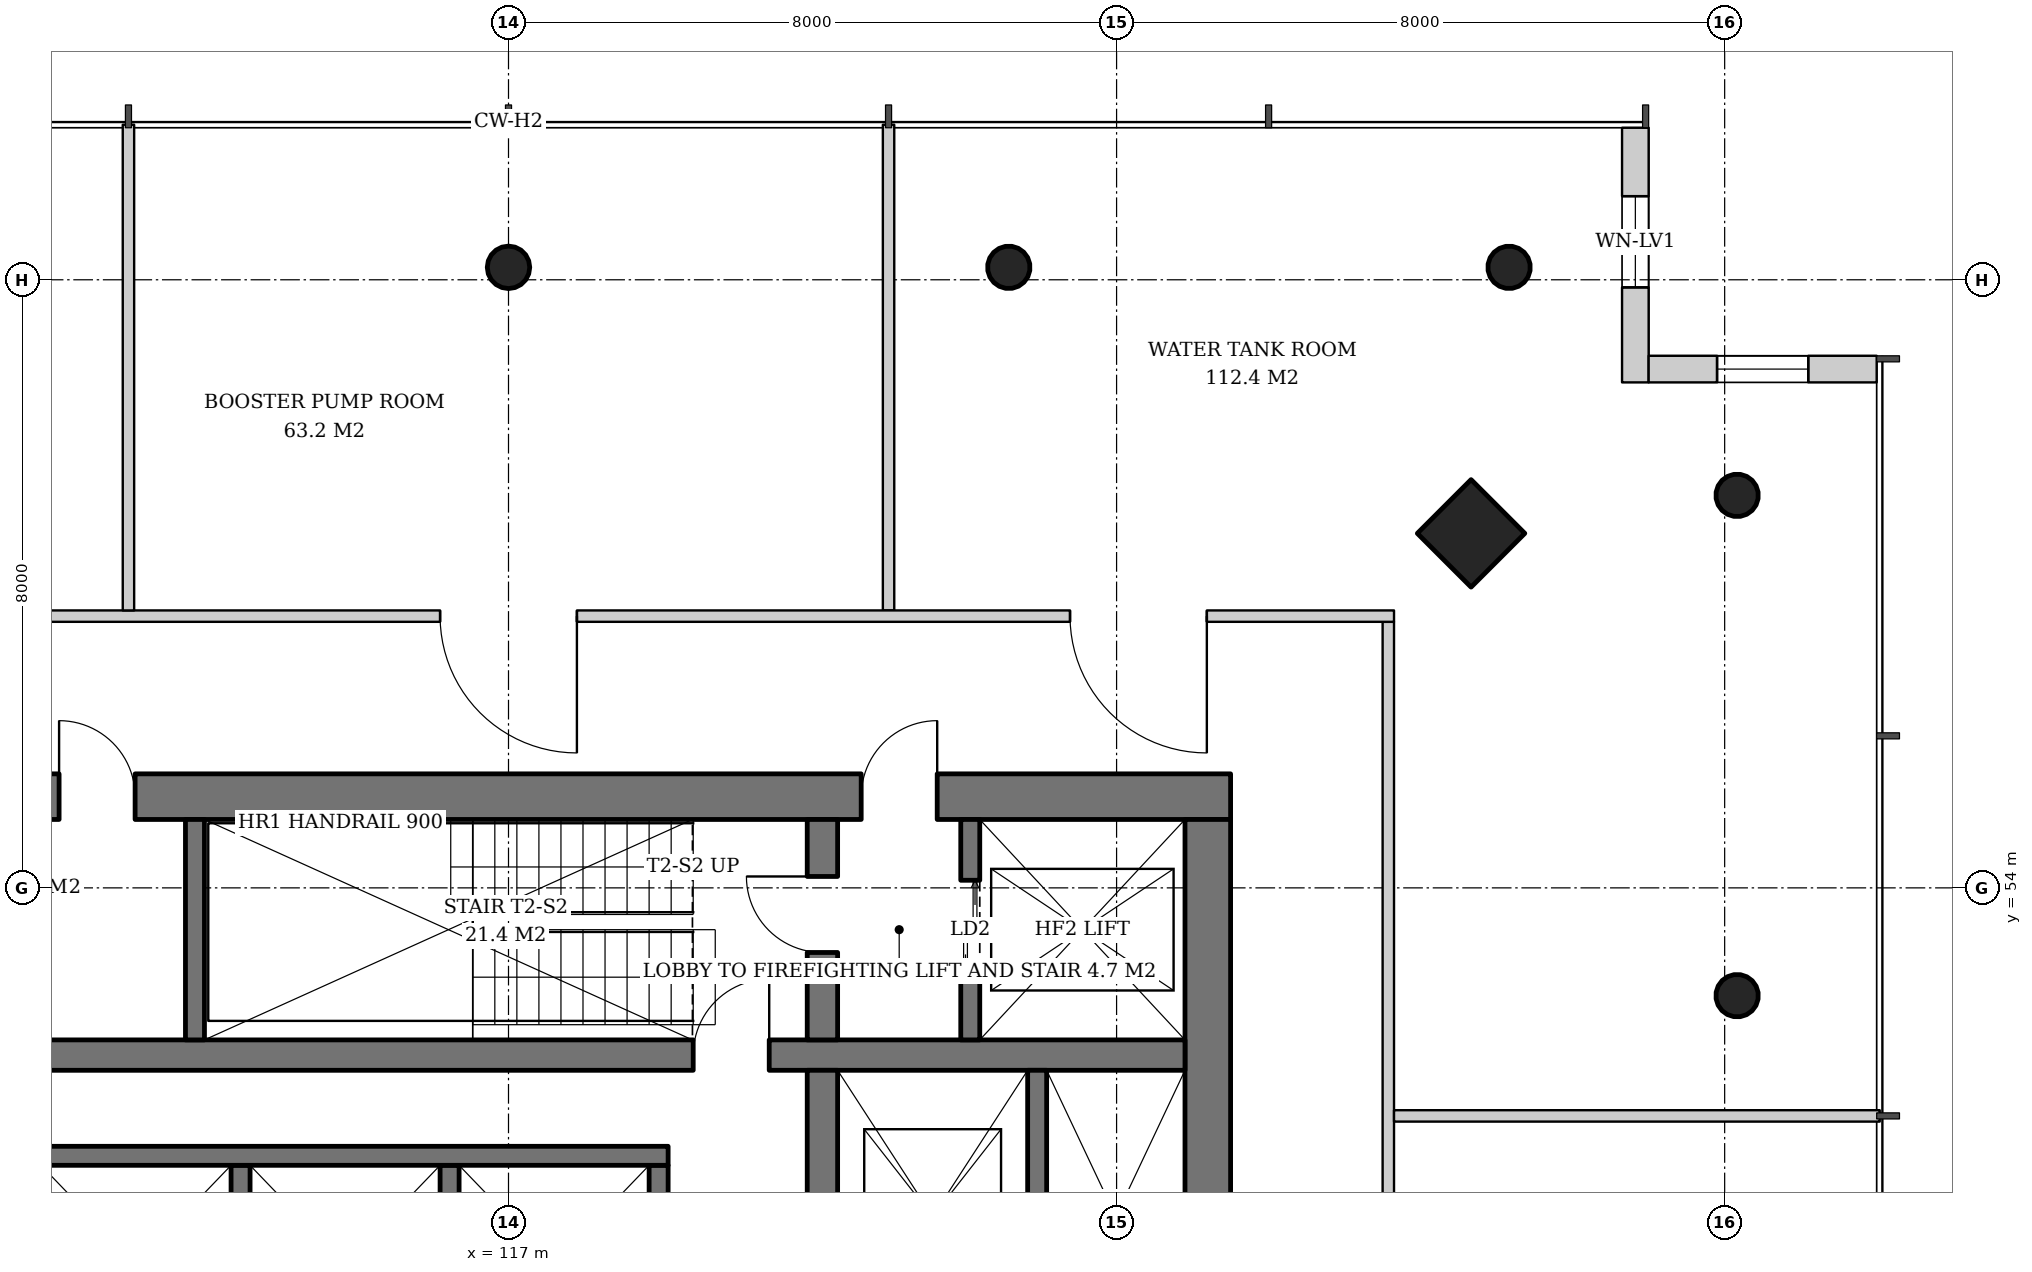
"""IFC4 building model, lengths in metres.
Left out: names, types, materials, properties, quantities, classifications, styles, units other than length and angle.
Written with IfcOpenShell. Run it as: python <this file> out.ifc"""

import sys

from ifc_helpers import new_model, si_unit, direction, frame, frame_2d, origin, origin_2d, place, context, subcontext, project, spatial, rectangle, hollow_circle, extrude, element, fill, save


model = new_model("IFC4")
c1 = context("Model", 3, precision=1e-05, world=origin(), true_north=direction((0.0, 1.0)))
c2 = subcontext(c1, "Body", "Model", "MODEL_VIEW")
j1 = project(units=[si_unit("LENGTHUNIT", "METRE"), si_unit("PLANEANGLEUNIT", "RADIAN")], contexts=[c1])
p1 = place(None, origin())
s1 = spatial("IfcSite", under=j1, at=p1, CompositionType="ELEMENT")
p2 = place(p1, origin())
s2 = spatial("IfcBuilding", under=s1, at=p2, CompositionType="ELEMENT")
p3 = place(p2, frame((0.0, 0.0, 85.6)))
s3 = spatial("IfcBuildingStorey", under=s2, at=p3, CompositionType="ELEMENT", Elevation=85.6)
p4 = place(p3, frame((129.716, 58.716, 0.0), z_axis=(-0.043032401563, -0.043032401563, 0.998146494675), x_axis=(0.707106781187, -0.707106781187, 0.0)))
e1 = element("IfcColumn", 1, at=p4, inside=s3, PredefinedType="COLUMN", context=c2, shape_type="SweptSolid", body=[
    extrude(rectangle(XDim=1.0, YDim=1.0, at=origin_2d()), origin(), (0.0, 0.0, 1.0), 3.807),
])
p5 = place(p3, frame((133.216, 59.216, 0.0), z_axis=(-0.043032401563, -0.043032401563, 0.998146494675), x_axis=(0.707106781187, -0.707106781187, 0.0)))
e2 = element("IfcColumn", 2, at=p5, inside=s3, PredefinedType="COLUMN", context=c2, shape_type="SweptSolid", body=[
    extrude(hollow_circle(Radius=0.28, WallThickness=0.02, at=origin_2d()), origin(), (0.0, 0.0, 1.0), 3.807),
])
p6 = place(p3, frame((133.216, 52.608, 0.0), z_axis=(-0.04306234503, -0.02149908433, 0.998841040313), x_axis=(0.446680166538, -0.894693706707, 0.0)))
e3 = element("IfcColumn", 3, at=p6, inside=s3, PredefinedType="COLUMN", context=c2, shape_type="SweptSolid", body=[
    extrude(hollow_circle(Radius=0.28, WallThickness=0.02, at=origin_2d()), origin(), (0.0, 0.0, 1.0), 3.804),
])
p7 = place(p3, frame((130.216, 62.216, 0.0), z_axis=(-0.043032401563, -0.043032401563, 0.998146494675), x_axis=(0.707106781187, -0.707106781187, 0.0)))
e4 = element("IfcColumn", 4, at=p7, inside=s3, PredefinedType="COLUMN", context=c2, shape_type="SweptSolid", body=[
    extrude(hollow_circle(Radius=0.28, WallThickness=0.02, at=origin_2d()), origin(), (0.0, 0.0, 1.0), 3.807),
])
p8 = place(p3, frame((123.608, 62.216, 0.0), z_axis=(-0.02149908433, -0.04306234503, 0.998841040313), x_axis=(0.894693706707, -0.446680166538, 0.0)))
e5 = element("IfcColumn", 5, at=p8, inside=s3, PredefinedType="COLUMN", context=c2, shape_type="SweptSolid", body=[
    extrude(hollow_circle(Radius=0.28, WallThickness=0.02, at=origin_2d()), origin(), (0.0, 0.0, 1.0), 3.804),
])
p9 = place(p3, frame((117.0, 62.216, 0.0), z_axis=(0.0, -0.043072300418, 0.999071957837), x_axis=(1.0, 0.0, 0.0)))
e6 = element("IfcColumn", 6, at=p9, inside=s3, PredefinedType="COLUMN", context=c2, shape_type="SweptSolid", body=[
    extrude(hollow_circle(Radius=0.28, WallThickness=0.02, at=origin_2d()), origin(), (0.0, 0.0, 1.0), 3.803),
])
p10 = place(p3, frame((107.5, 55.2, 0.0), z_axis=(0.0, 0.0, 1.0), x_axis=(1.0, 0.0, 0.0)))
e7 = element("IfcWall", 7, at=p10, inside=s3, PredefinedType="SHEAR", context=c2, shape_type="SweptSolid", body=[
    extrude(rectangle(XDim=19.0, YDim=0.6, at=frame_2d((9.5, 0.0))), origin(), (0.0, 0.0, 1.0), 3.8),
])
p11 = place(p10, frame((14.14, 0.0, 0.0)))
e8 = element("IfcOpeningElement", 8, at=p11, cuts=e7, PredefinedType="OPENING", context=c2, shape_type="SweptSolid", body=[
    extrude(rectangle(XDim=1.0, YDim=2.1, at=frame_2d((0.5, 1.05))), frame((0.0, 0.31, 0.0), z_axis=(0.0, -1.0, 0.0), x_axis=(1.0, 0.0, 0.0)), (0.0, 0.0, 1.0), 0.62),
])
p12 = place(p10, frame((1.675, 0.0, 0.0)))
e9 = element("IfcOpeningElement", 9, at=p12, cuts=e7, PredefinedType="OPENING", context=c2, shape_type="SweptSolid", body=[
    extrude(rectangle(XDim=1.0, YDim=2.1, at=frame_2d((0.5, 1.05))), frame((0.0, 0.31, 0.0), z_axis=(0.0, -1.0, 0.0), x_axis=(1.0, 0.0, 0.0)), (0.0, 0.0, 1.0), 0.62),
])
p13 = place(p10, frame((3.587, 0.0, 0.0)))
e10 = element("IfcOpeningElement", 10, at=p13, cuts=e7, PredefinedType="OPENING", context=c2, shape_type="SweptSolid", body=[
    extrude(rectangle(XDim=1.0, YDim=2.1, at=frame_2d((0.5, 1.05))), frame((0.0, 0.31, 0.0), z_axis=(0.0, -1.0, 0.0), x_axis=(1.0, 0.0, 0.0)), (0.0, 0.0, 1.0), 0.62),
])
p14 = place(p3, frame((126.2, 37.1, 0.0), z_axis=(0.0, 0.0, 1.0), x_axis=(0.0, 1.0, 0.0)))
e11 = element("IfcWall", 11, at=p14, inside=s3, PredefinedType="SHEAR", context=c2, shape_type="SweptSolid", body=[
    extrude(rectangle(XDim=17.8, YDim=0.6, at=frame_2d((8.9, 0.0))), origin(), (0.0, 0.0, 1.0), 3.8),
])
p15 = place(p14, frame((8.0, 0.0, 0.0)))
e12 = element("IfcOpeningElement", 12, at=p15, cuts=e11, PredefinedType="OPENING", context=c2, shape_type="SweptSolid", body=[
    extrude(rectangle(XDim=1.8, YDim=2.4, at=frame_2d((0.9, 1.2))), frame((0.0, 0.31, 0.0), z_axis=(0.0, -1.0, 0.0), x_axis=(1.0, 0.0, 0.0)), (0.0, 0.0, 1.0), 0.62),
])
p16 = place(p3, frame((108.1, 51.8, 0.0), z_axis=(0.0, 0.0, 1.0), x_axis=(1.0, 0.0, 0.0)))
e13 = element("IfcWall", 13, at=p16, inside=s3, PredefinedType="SHEAR", context=c2, shape_type="SweptSolid", body=[
    extrude(rectangle(XDim=17.8, YDim=0.4, at=frame_2d((8.9, 0.0))), origin(), (0.0, 0.0, 1.0), 3.8),
])
p17 = place(p16, frame((11.33, 0.0, 0.0)))
e14 = element("IfcOpeningElement", 14, at=p17, cuts=e13, PredefinedType="OPENING", context=c2, shape_type="SweptSolid", body=[
    extrude(rectangle(XDim=1.0, YDim=2.1, at=frame_2d((0.5, 1.05))), frame((0.0, 0.21, 0.0), z_axis=(0.0, -1.0, 0.0), x_axis=(1.0, 0.0, 0.0)), (0.0, 0.0, 1.0), 0.42),
])
p18 = place(p3, frame((121.13, 40.4, 0.0), z_axis=(0.0, 0.0, 1.0), x_axis=(0.0, 1.0, 0.0)))
e15 = element("IfcWall", 15, at=p18, inside=s3, PredefinedType="SHEAR", context=c2, shape_type="SweptSolid", body=[
    extrude(rectangle(XDim=11.2, YDim=0.4, at=frame_2d((5.6, 0.0))), origin(), (0.0, 0.0, 1.0), 3.8),
])
p19 = place(p18, frame((5.1, 0.0, 0.0)))
e16 = element("IfcOpeningElement", 16, at=p19, cuts=e15, PredefinedType="OPENING", context=c2, shape_type="SweptSolid", body=[
    extrude(rectangle(XDim=1.0, YDim=2.1, at=frame_2d((0.5, 1.05))), frame((0.0, 0.21, 0.0), z_axis=(0.0, -1.0, 0.0), x_axis=(1.0, 0.0, 0.0)), (0.0, 0.0, 1.0), 0.42),
])
p20 = place(p3, frame((121.13, 52.0, 0.0), z_axis=(0.0, 0.0, 1.0), x_axis=(0.0, 1.0, 0.0)))
e17 = element("IfcWall", 17, at=p20, inside=s3, PredefinedType="SHEAR", context=c2, shape_type="SweptSolid", body=[
    extrude(rectangle(XDim=2.9, YDim=0.4, at=frame_2d((1.45, 0.0))), origin(), (0.0, 0.0, 1.0), 3.8),
])
p21 = place(p20, frame((1.15, 0.0, 0.0)))
e18 = element("IfcOpeningElement", 18, at=p21, cuts=e17, PredefinedType="OPENING", context=c2, shape_type="SweptSolid", body=[
    extrude(rectangle(XDim=1.0, YDim=2.1, at=frame_2d((0.5, 1.05))), frame((0.0, 0.21, 0.0), z_axis=(0.0, -1.0, 0.0), x_axis=(1.0, 0.0, 0.0)), (0.0, 0.0, 1.0), 0.42),
])
p22 = place(p3, frame((131.825, 64.0, 0.0), z_axis=(0.0, 0.0, 1.0), x_axis=(0.0, -1.0, 0.0)))
e19 = element("IfcWall", 19, at=p22, inside=s3, PredefinedType="SOLIDWALL", context=c2, shape_type="SweptSolid", body=[
    extrude(rectangle(XDim=3.35, YDim=0.35, at=frame_2d((1.675, 0.0))), origin(), (0.0, 0.0, 1.0), 3.6),
])
p23 = place(p22, frame((0.9, 0.0, 0.6)))
e20 = element("IfcOpeningElement", 20, at=p23, cuts=e19, PredefinedType="OPENING", context=c2, shape_type="SweptSolid", body=[
    extrude(rectangle(XDim=1.2, YDim=2.55, at=frame_2d((0.6, 1.275))), frame((0.0, 0.185, 0.0), z_axis=(0.0, -1.0, 0.0), x_axis=(1.0, 0.0, 0.0)), (0.0, 0.0, 1.0), 0.37),
])
p24 = place(p3, frame((132.0, 60.825, 0.0), z_axis=(0.0, 0.0, 1.0), x_axis=(1.0, 0.0, 0.0)))
e21 = element("IfcWall", 21, at=p24, inside=s3, PredefinedType="SOLIDWALL", context=c2, shape_type="SweptSolid", body=[
    extrude(rectangle(XDim=3.0, YDim=0.35, at=frame_2d((1.5, 0.0))), origin(), (0.0, 0.0, 1.0), 3.6),
])
p25 = place(p24, frame((0.9, 0.0, 0.6)))
e22 = element("IfcOpeningElement", 22, at=p25, cuts=e21, PredefinedType="OPENING", context=c2, shape_type="SweptSolid", body=[
    extrude(rectangle(XDim=1.2, YDim=2.55, at=frame_2d((0.6, 1.275))), frame((0.0, 0.185, 0.0), z_axis=(0.0, -1.0, 0.0), x_axis=(1.0, 0.0, 0.0)), (0.0, 0.0, 1.0), 0.37),
])
p26 = place(p3, frame((112.875, 52.0, 0.0), z_axis=(0.0, 0.0, 1.0), x_axis=(0.0, 1.0, 0.0)))
e23 = element("IfcWall", 23, at=p26, inside=s3, PredefinedType="SHEAR", context=c2, shape_type="SweptSolid", body=[
    extrude(rectangle(XDim=2.9, YDim=0.25, at=frame_2d((1.45, 0.0))), origin(), (0.0, 0.0, 1.0), 3.8),
])
p27 = place(p3, frame((123.075, 52.0, 0.0), z_axis=(0.0, 0.0, 1.0), x_axis=(0.0, 1.0, 0.0)))
e24 = element("IfcWall", 24, at=p27, inside=s3, PredefinedType="SHEAR", context=c2, shape_type="SweptSolid", body=[
    extrude(rectangle(XDim=2.9, YDim=0.25, at=frame_2d((1.45, 0.0))), origin(), (0.0, 0.0, 1.0), 3.8),
])
p28 = place(p27, frame((0.8, 0.0, 0.0)))
e25 = element("IfcOpeningElement", 25, at=p28, cuts=e24, PredefinedType="OPENING", context=c2, shape_type="SweptSolid", body=[
    extrude(rectangle(XDim=1.3, YDim=2.2, at=frame_2d((0.65, 1.1))), frame((0.0, 0.135, 0.0), z_axis=(0.0, -1.0, 0.0), x_axis=(1.0, 0.0, 0.0)), (0.0, 0.0, 1.0), 0.27),
])
for number, where, z_axis, x_axis in (
    (26, (113.475, 47.75, 0.0), (0.0, 0.0, 1.0), (0.0, 1.0, 0.0)),
    (27, (116.225, 47.75, 0.0), (0.0, 0.0, 1.0), (0.0, 1.0, 0.0)),
    (28, (118.975, 47.75, 0.0), (0.0, 0.0, 1.0), (0.0, 1.0, 0.0)),
):
    element("IfcWall", number, at=place(p3, frame(where, z_axis=z_axis, x_axis=x_axis)), inside=s3, PredefinedType="SHEAR", context=c2, shape_type="SweptSolid", body=[
        extrude(rectangle(XDim=2.6, YDim=0.25, at=frame_2d((1.3, 0.0))), origin(), (0.0, 0.0, 1.0), 3.8),
    ])
p29 = place(p3, frame((108.1, 50.475, 0.0), z_axis=(0.0, 0.0, 1.0), x_axis=(1.0, 0.0, 0.0)))
e29 = element("IfcWall", 29, at=p29, inside=s3, PredefinedType="SHEAR", context=c2, shape_type="SweptSolid", body=[
    extrude(rectangle(XDim=11.0, YDim=0.25, at=frame_2d((5.5, 0.0))), origin(), (0.0, 0.0, 1.0), 3.8),
])
p30 = place(p3, frame((123.955, 47.75, 0.0), z_axis=(0.0, 0.0, 1.0), x_axis=(0.0, 1.0, 0.0)))
e30 = element("IfcWall", 30, at=p30, inside=s3, PredefinedType="SHEAR", context=c2, shape_type="SweptSolid", body=[
    extrude(rectangle(XDim=3.85, YDim=0.25, at=frame_2d((1.925, 0.0))), origin(), (0.0, 0.0, 1.0), 3.8),
])
p31 = place(p3, frame((128.575, 34.35, 0.0), z_axis=(0.0, 0.0, 1.0), x_axis=(0.0, 1.0, 0.0)))
e31 = element("IfcWall", 31, at=p31, inside=s3, PredefinedType="SOLIDWALL", context=c2, shape_type="SweptSolid", body=[
    extrude(rectangle(XDim=23.15, YDim=0.15, at=frame_2d((11.575, 0.0))), origin(), (0.0, 0.0, 1.0), 2.9),
])
p32 = place(p31, frame((2.462, 0.0, 0.0)))
e32 = element("IfcOpeningElement", 32, at=p32, cuts=e31, PredefinedType="OPENING", context=c2, shape_type="SweptSolid", body=[
    extrude(rectangle(XDim=1.8, YDim=2.4, at=frame_2d((0.9, 1.2))), frame((0.0, 0.085, 0.0), z_axis=(0.0, -1.0, 0.0), x_axis=(1.0, 0.0, 0.0)), (0.0, 0.0, 1.0), 0.17),
])
p33 = place(p31, frame((10.75, 0.0, 0.0)))
e33 = element("IfcOpeningElement", 33, at=p33, cuts=e31, PredefinedType="OPENING", context=c2, shape_type="SweptSolid", body=[
    extrude(rectangle(XDim=1.8, YDim=2.4, at=frame_2d((0.9, 1.2))), frame((0.0, 0.085, 0.0), z_axis=(0.0, -1.0, 0.0), x_axis=(1.0, 0.0, 0.0)), (0.0, 0.0, 1.0), 0.17),
])
p34 = place(p3, frame((128.65, 51.0, 0.0), z_axis=(0.0, 0.0, 1.0), x_axis=(1.0, 0.0, 0.0)))
e34 = element("IfcWall", 34, at=p34, inside=s3, PredefinedType="SOLIDWALL", context=c2, shape_type="SweptSolid", body=[
    extrude(rectangle(XDim=6.39, YDim=0.15, at=frame_2d((3.195, 0.0))), origin(), (0.0, 0.0, 1.0), 3.2),
])
p35 = place(p3, frame((122.0, 57.65, 0.0), z_axis=(0.0, 0.0, 1.0), x_axis=(0.0, 1.0, 0.0)))
e35 = element("IfcWall", 35, at=p35, inside=s3, PredefinedType="SOLIDWALL", context=c2, shape_type="SweptSolid", body=[
    extrude(rectangle(XDim=6.39, YDim=0.15, at=frame_2d((3.195, 0.0))), origin(), (0.0, 0.0, 1.0), 3.0),
])
p36 = place(p3, frame((128.65, 57.575, 0.0), z_axis=(0.0, 0.0, 1.0), x_axis=(-1.0, 0.0, 0.0)))
e36 = element("IfcWall", 36, at=p36, inside=s3, PredefinedType="SOLIDWALL", context=c2, shape_type="SweptSolid", body=[
    extrude(rectangle(XDim=23.15, YDim=0.15, at=frame_2d((11.575, 0.0))), origin(), (0.0, 0.0, 1.0), 2.9),
])
p37 = place(p36, frame((2.462, 0.0, 0.0)))
e37 = element("IfcOpeningElement", 37, at=p37, cuts=e36, PredefinedType="OPENING", context=c2, shape_type="SweptSolid", body=[
    extrude(rectangle(XDim=1.8, YDim=2.4, at=frame_2d((0.9, 1.2))), frame((0.0, 0.085, 0.0), z_axis=(0.0, -1.0, 0.0), x_axis=(1.0, 0.0, 0.0)), (0.0, 0.0, 1.0), 0.17),
])
p38 = place(p36, frame((10.75, 0.0, 0.0)))
e38 = element("IfcOpeningElement", 38, at=p38, cuts=e36, PredefinedType="OPENING", context=c2, shape_type="SweptSolid", body=[
    extrude(rectangle(XDim=1.8, YDim=2.4, at=frame_2d((0.9, 1.2))), frame((0.0, 0.085, 0.0), z_axis=(0.0, -1.0, 0.0), x_axis=(1.0, 0.0, 0.0)), (0.0, 0.0, 1.0), 0.17),
])
p39 = place(p3, frame((112.0, 57.65, 0.0), z_axis=(0.0, 0.0, 1.0), x_axis=(0.0, 1.0, 0.0)))
e39 = element("IfcWall", 39, at=p39, inside=s3, PredefinedType="SOLIDWALL", context=c2, shape_type="SweptSolid", body=[
    extrude(rectangle(XDim=6.39, YDim=0.15, at=frame_2d((3.195, 0.0))), origin(), (0.0, 0.0, 1.0), 3.2),
])
p40 = place(p23, origin())
e40 = element("IfcWindow", 40, at=p40, inside=s3, PartitioningType="SINGLE_PANEL", PredefinedType="USERDEFINED", context=c2, shape_type="SweptSolid", body=[
    extrude(rectangle(XDim=1.2, YDim=2.55, at=frame_2d((0.6, 1.275))), frame((0.0, 0.03, 0.0), z_axis=(0.0, -1.0, 0.0), x_axis=(1.0, 0.0, 0.0)), (0.0, 0.0, 1.0), 0.06),
])
fill(e20, e40)
p41 = place(p25, origin())
e41 = element("IfcWindow", 41, at=p41, inside=s3, PartitioningType="SINGLE_PANEL", PredefinedType="USERDEFINED", context=c2, shape_type="SweptSolid", body=[
    extrude(rectangle(XDim=1.2, YDim=2.55, at=frame_2d((0.6, 1.275))), frame((0.0, 0.03, 0.0), z_axis=(0.0, -1.0, 0.0), x_axis=(1.0, 0.0, 0.0)), (0.0, 0.0, 1.0), 0.06),
])
fill(e22, e41)
p42 = place(p28, origin())
e42 = element("IfcDoor", 42, at=p42, inside=s3, OperationType="DOUBLE_DOOR_SLIDING", PredefinedType="DOOR", context=c2, shape_type="SweptSolid", body=[
    extrude(rectangle(XDim=1.3, YDim=2.2, at=frame_2d((0.65, 1.1))), frame((0.0, 0.025, 0.0), z_axis=(0.0, -1.0, 0.0), x_axis=(1.0, 0.0, 0.0)), (0.0, 0.0, 1.0), 0.05),
])
fill(e25, e42)
p43 = place(p21, origin())
e43 = element("IfcDoor", 43, at=p43, inside=s3, OperationType="SINGLE_SWING_RIGHT", PredefinedType="DOOR", context=c2, shape_type="SweptSolid", body=[
    extrude(rectangle(XDim=1.0, YDim=2.1, at=frame_2d((0.5, 1.05))), frame((0.0, 0.025, 0.0), z_axis=(0.0, -1.0, 0.0), x_axis=(1.0, 0.0, 0.0)), (0.0, 0.0, 1.0), 0.05),
])
fill(e18, e43)
p44 = place(p11, origin())
e44 = element("IfcDoor", 44, at=p44, inside=s3, OperationType="SINGLE_SWING_RIGHT", PredefinedType="DOOR", context=c2, shape_type="SweptSolid", body=[
    extrude(rectangle(XDim=1.0, YDim=2.1, at=frame_2d((0.5, 1.05))), frame((0.0, 0.025, 0.0), z_axis=(0.0, -1.0, 0.0), x_axis=(1.0, 0.0, 0.0)), (0.0, 0.0, 1.0), 0.05),
])
fill(e8, e44)
p45 = place(p17, origin())
e45 = element("IfcDoor", 45, at=p45, inside=s3, OperationType="SINGLE_SWING_RIGHT", PredefinedType="DOOR", context=c2, shape_type="SweptSolid", body=[
    extrude(rectangle(XDim=1.0, YDim=2.1, at=frame_2d((0.5, 1.05))), frame((0.0, 0.025, 0.0), z_axis=(0.0, -1.0, 0.0), x_axis=(1.0, 0.0, 0.0)), (0.0, 0.0, 1.0), 0.05),
])
fill(e14, e45)
p46 = place(p13, origin())
e46 = element("IfcDoor", 46, at=p46, inside=s3, OperationType="SINGLE_SWING_LEFT", PredefinedType="DOOR", context=c2, shape_type="SweptSolid", body=[
    extrude(rectangle(XDim=1.0, YDim=2.1, at=frame_2d((0.5, 1.05))), frame((0.0, -0.24, 0.0), z_axis=(0.0, -1.0, 0.0), x_axis=(1.0, 0.0, 0.0)), (0.0, 0.0, 1.0), 0.05),
])
fill(e10, e46)
p47 = place(p37, origin())
e47 = element("IfcDoor", 47, at=p47, inside=s3, OperationType="DOUBLE_DOOR_SINGLE_SWING", PredefinedType="DOOR", context=c2, shape_type="SweptSolid", body=[
    extrude(rectangle(XDim=1.8, YDim=2.4, at=frame_2d((0.9, 1.2))), frame((0.0, 0.025, 0.0), z_axis=(0.0, -1.0, 0.0), x_axis=(1.0, 0.0, 0.0)), (0.0, 0.0, 1.0), 0.05),
])
fill(e37, e47)
p48 = place(p38, origin())
e48 = element("IfcDoor", 48, at=p48, inside=s3, OperationType="DOUBLE_DOOR_SINGLE_SWING", PredefinedType="DOOR", context=c2, shape_type="SweptSolid", body=[
    extrude(rectangle(XDim=1.8, YDim=2.4, at=frame_2d((0.9, 1.2))), frame((0.0, 0.025, 0.0), z_axis=(0.0, -1.0, 0.0), x_axis=(1.0, 0.0, 0.0)), (0.0, 0.0, 1.0), 0.05),
])
fill(e38, e48)
save(model, sys.argv[1])
